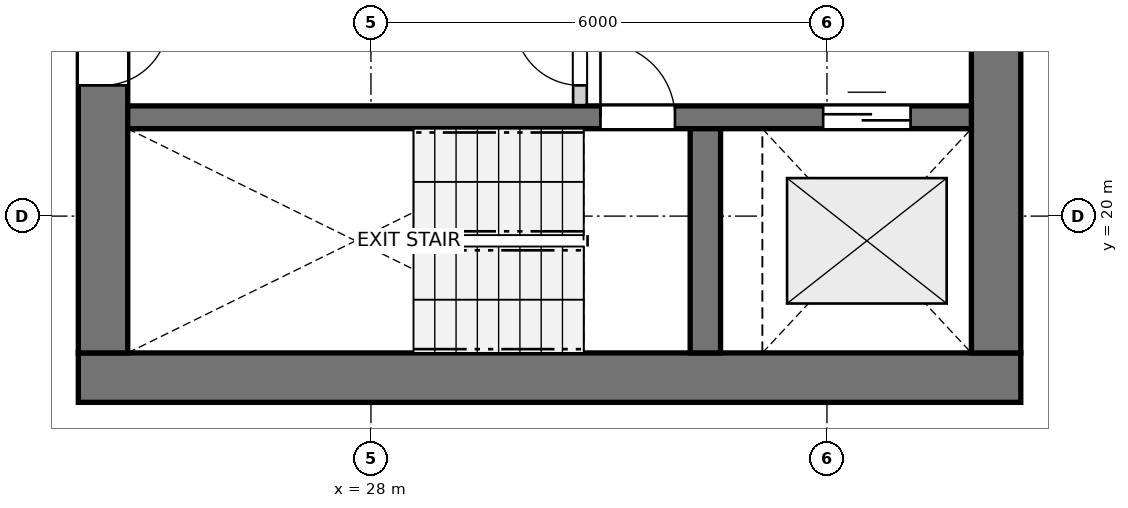
"""IFC4 building model, lengths in metres.
Left out: names, types, materials, properties, quantities, classifications, styles, units other than length and angle.
Written with IfcOpenShell. Run it as: python <this file> out.ifc"""

import sys

from ifc_helpers import new_model, si_unit, direction, frame, frame_2d, origin, place, context, subcontext, project, spatial, rectangle, extrude, source, transform, mapped, element, fill, save


model = new_model("IFC4")
c1 = context("Model", 3, precision=1e-05, world=origin(), true_north=direction((0.0, 1.0)))
c2 = subcontext(c1, "Body", "Model", "MODEL_VIEW")
j1 = project(units=[si_unit("LENGTHUNIT", "METRE"), si_unit("PLANEANGLEUNIT", "RADIAN")], contexts=[c1])
p1 = place(None, origin())
s1 = spatial("IfcSite", under=j1, at=p1, CompositionType="ELEMENT")
p2 = place(p1, origin())
s2 = spatial("IfcBuilding", under=s1, at=p2, CompositionType="ELEMENT")
p3 = place(p2, frame((0.0, 0.0, 99.2)))
s3 = spatial("IfcBuildingStorey", under=s2, at=p3, CompositionType="ELEMENT", Elevation=99.2)
p4 = place(p3, frame((24.15, 17.875, 0.0), z_axis=(0.0, 0.0, 1.0), x_axis=(1.0, 0.0, 0.0)))
e1 = element("IfcWall", 1, at=p4, inside=s3, PredefinedType="SHEAR", context=c2, shape_type="SweptSolid", body=[
    extrude(rectangle(XDim=12.4, YDim=0.65, at=frame_2d((6.2, 0.0))), origin(), (0.0, 0.0, 1.0), 2.95),
])
p5 = place(p3, frame((24.475, 33.8, 0.0), z_axis=(0.0, 0.0, 1.0), x_axis=(0.0, -1.0, 0.0)))
e2 = element("IfcWall", 2, at=p5, inside=s3, PredefinedType="SHEAR", context=c2, shape_type="SweptSolid", body=[
    extrude(rectangle(XDim=15.6, YDim=0.65, at=frame_2d((7.8, 0.0))), origin(), (0.0, 0.0, 1.0), 2.95),
])
p6 = place(p5, frame((7.05, 0.0, 0.0)))
e3 = element("IfcOpeningElement", 3, at=p6, cuts=e2, PredefinedType="OPENING", context=c2, shape_type="SweptSolid", body=[
    extrude(rectangle(XDim=1.5, YDim=2.15, at=frame_2d((0.75, 1.075))), frame((0.0, 0.335, 0.0), z_axis=(0.0, -1.0, 0.0), x_axis=(1.0, 0.0, 0.0)), (0.0, 0.0, 1.0), 0.67),
])
p7 = place(p5, frame((3.52, 0.0, 0.0)))
e4 = element("IfcOpeningElement", 4, at=p7, cuts=e2, PredefinedType="OPENING", context=c2, shape_type="SweptSolid", body=[
    extrude(rectangle(XDim=0.86, YDim=2.05, at=frame_2d((0.43, 1.025))), frame((0.0, 0.335, 0.0), z_axis=(0.0, -1.0, 0.0), x_axis=(1.0, 0.0, 0.0)), (0.0, 0.0, 1.0), 0.67),
])
p8 = place(p5, frame((11.22, 0.0, 0.0)))
e5 = element("IfcOpeningElement", 5, at=p8, cuts=e2, PredefinedType="OPENING", context=c2, shape_type="SweptSolid", body=[
    extrude(rectangle(XDim=0.86, YDim=2.05, at=frame_2d((0.43, 1.025))), frame((0.0, 0.335, 0.0), z_axis=(0.0, -1.0, 0.0), x_axis=(1.0, 0.0, 0.0)), (0.0, 0.0, 1.0), 0.67),
])
p9 = place(p3, frame((36.225, 18.2, 0.0), z_axis=(0.0, 0.0, 1.0), x_axis=(0.0, 1.0, 0.0)))
e6 = element("IfcWall", 6, at=p9, inside=s3, PredefinedType="SHEAR", context=c2, shape_type="SweptSolid", body=[
    extrude(rectangle(XDim=15.6, YDim=0.65, at=frame_2d((7.8, 0.0))), origin(), (0.0, 0.0, 1.0), 2.95),
])
p10 = place(p9, frame((4.25, 0.0, 0.0)))
e7 = element("IfcOpeningElement", 7, at=p10, cuts=e6, PredefinedType="OPENING", context=c2, shape_type="SweptSolid", body=[
    extrude(rectangle(XDim=1.1, YDim=2.15, at=frame_2d((0.55, 1.075))), frame((0.0, 0.335, 0.0), z_axis=(0.0, -1.0, 0.0), x_axis=(1.0, 0.0, 0.0)), (0.0, 0.0, 1.0), 0.67),
])
p11 = place(p9, frame((10.25, 0.0, 0.0)))
e8 = element("IfcOpeningElement", 8, at=p11, cuts=e6, PredefinedType="OPENING", context=c2, shape_type="SweptSolid", body=[
    extrude(rectangle(XDim=1.1, YDim=2.15, at=frame_2d((0.55, 1.075))), frame((0.0, 0.335, 0.0), z_axis=(0.0, -1.0, 0.0), x_axis=(1.0, 0.0, 0.0)), (0.0, 0.0, 1.0), 0.67),
])
p12 = place(p3, frame((24.8, 21.3, 0.0), z_axis=(0.0, 0.0, 1.0), x_axis=(1.0, 0.0, 0.0)))
e9 = element("IfcWall", 9, at=p12, inside=s3, PredefinedType="SHEAR", context=c2, shape_type="SweptSolid", body=[
    extrude(rectangle(XDim=11.1, YDim=0.3, at=frame_2d((5.55, 0.0))), origin(), (0.0, 0.0, 1.0), 2.95),
])
p13 = place(p12, frame((6.22, 0.0, 0.0)))
e10 = element("IfcOpeningElement", 10, at=p13, cuts=e9, PredefinedType="OPENING", context=c2, shape_type="SweptSolid", body=[
    extrude(rectangle(XDim=0.98, YDim=2.15, at=frame_2d((0.49, 1.075))), frame((0.0, 0.16, 0.0), z_axis=(0.0, -1.0, 0.0), x_axis=(1.0, 0.0, 0.0)), (0.0, 0.0, 1.0), 0.32),
])
p14 = place(p12, frame((9.15, 0.0, 0.0)))
e11 = element("IfcOpeningElement", 11, at=p14, cuts=e9, PredefinedType="OPENING", context=c2, shape_type="SweptSolid", body=[
    extrude(rectangle(XDim=1.15, YDim=2.15, at=frame_2d((0.575, 1.075))), frame((0.0, 0.16, 0.0), z_axis=(0.0, -1.0, 0.0), x_axis=(1.0, 0.0, 0.0)), (0.0, 0.0, 1.0), 0.32),
])
p15 = place(p3, frame((32.4, 18.2, 0.0), z_axis=(0.0, 0.0, 1.0), x_axis=(0.0, 1.0, 0.0)))
e12 = element("IfcWall", 12, at=p15, inside=s3, PredefinedType="SHEAR", context=c2, shape_type="SweptSolid", body=[
    extrude(rectangle(XDim=2.95, YDim=0.4, at=frame_2d((1.475, 0.0))), origin(), (0.0, 0.0, 1.0), 2.95),
])
p16 = place(p3, frame((30.75, 21.46, 0.0), z_axis=(0.0, 0.0, 1.0), x_axis=(0.0, 1.0, 0.0)))
e13 = element("IfcWall", 13, at=p16, inside=s3, PredefinedType="PARTITIONING", context=c2, shape_type="SweptSolid", body=[
    extrude(rectangle(XDim=3.11, YDim=0.18, at=frame_2d((1.555, 0.0))), origin(), (0.0, 0.0, 1.0), 2.95),
])
p17 = place(p16, frame((0.26, 0.0, 0.0)))
e14 = element("IfcOpeningElement", 14, at=p17, cuts=e13, PredefinedType="OPENING", context=c2, shape_type="SweptSolid", body=[
    extrude(rectangle(XDim=0.86, YDim=2.05, at=frame_2d((0.43, 1.025))), frame((0.0, 0.1, 0.0), z_axis=(0.0, -1.0, 0.0), x_axis=(1.0, 0.0, 0.0)), (0.0, 0.0, 1.0), 0.2),
])
m1 = source(origin(), c2, "Body", "SweptSolid", [
    extrude(rectangle(XDim=0.98, YDim=2.15, at=frame_2d((0.49, 1.075))), frame((0.0, 0.025, 0.0), z_axis=(0.0, -1.0, 0.0), x_axis=(1.0, 0.0, 0.0)), (0.0, 0.0, 1.0), 0.05),
])
p18 = place(p13, origin())
e15 = element("IfcDoor", 15, at=p18, inside=s3, OperationType="SINGLE_SWING_LEFT", PredefinedType="DOOR", context=c2, shape_type="MappedRepresentation", body=[
    mapped(m1, transform((0.0, 0.0, 0.0), x_axis=(1.0, 0.0, 0.0), y_axis=(0.0, 1.0, 0.0), z_axis=(0.0, 0.0, 1.0), scale=1.0)),
])
fill(e10, e15)
m2 = source(origin(), c2, "Body", "SweptSolid", [
    extrude(rectangle(XDim=1.15, YDim=2.15, at=frame_2d((0.575, 1.075))), frame((0.0, 0.025, 0.0), z_axis=(0.0, -1.0, 0.0), x_axis=(1.0, 0.0, 0.0)), (0.0, 0.0, 1.0), 0.05),
])
p19 = place(p14, origin())
e16 = element("IfcDoor", 16, at=p19, inside=s3, OperationType="DOUBLE_DOOR_SLIDING", PredefinedType="DOOR", context=c2, shape_type="MappedRepresentation", body=[
    mapped(m2, transform((0.0, 0.0, 0.0), x_axis=(1.0, 0.0, 0.0), y_axis=(0.0, 1.0, 0.0), z_axis=(0.0, 0.0, 1.0), scale=1.0)),
])
fill(e11, e16)
m3 = source(origin(), c2, "Body", "SweptSolid", [
    extrude(rectangle(XDim=0.86, YDim=2.05, at=frame_2d((0.43, 1.025))), frame((0.0, 0.025, 0.0), z_axis=(0.0, -1.0, 0.0), x_axis=(1.0, 0.0, 0.0)), (0.0, 0.0, 1.0), 0.05),
])
p20 = place(p8, origin())
e17 = element("IfcDoor", 17, at=p20, inside=s3, OperationType="SINGLE_SWING_LEFT", PredefinedType="DOOR", context=c2, shape_type="MappedRepresentation", body=[
    mapped(m3, transform((0.0, 0.0, 0.0), x_axis=(1.0, 0.0, 0.0), y_axis=(0.0, 1.0, 0.0), z_axis=(0.0, 0.0, 1.0), scale=1.0)),
])
fill(e5, e17)
p21 = place(p17, origin())
e18 = element("IfcDoor", 18, at=p21, inside=s3, OperationType="SINGLE_SWING_RIGHT", PredefinedType="DOOR", context=c2, shape_type="MappedRepresentation", body=[
    mapped(m3, transform((0.0, 0.0, 0.0), x_axis=(1.0, 0.0, 0.0), y_axis=(0.0, 1.0, 0.0), z_axis=(0.0, 0.0, 1.0), scale=1.0)),
])
fill(e14, e18)
save(model, sys.argv[1])
